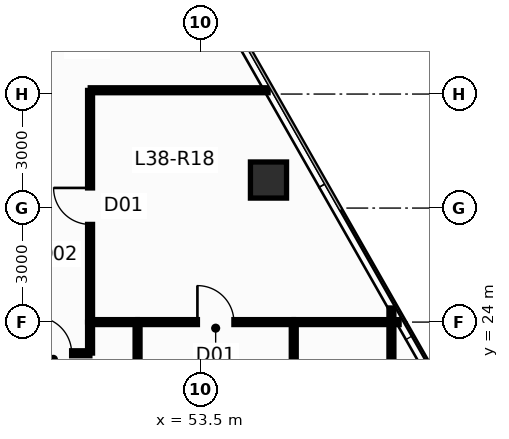
"""IFC4 building model, lengths in metres.
Left out: names, types, materials, properties, quantities, classifications, styles, units other than length and angle.
Written with IfcOpenShell. Run it as: python <this file> out.ifc"""

import sys

from ifc_helpers import new_model, si_unit, direction, frame, frame_2d, origin, origin_2d, place, context, subcontext, project, spatial, rectangle, hollow_rectangle, extrude, source, transform, mapped, element, fill, save


model = new_model("IFC4")
c1 = context("Model", 3, precision=1e-05, world=origin(), true_north=direction((0.0, 1.0)))
c2 = subcontext(c1, "Body", "Model", "MODEL_VIEW")
j1 = project(units=[si_unit("LENGTHUNIT", "METRE"), si_unit("PLANEANGLEUNIT", "RADIAN")], contexts=[c1])
p1 = place(None, origin())
s1 = spatial("IfcSite", under=j1, at=p1, CompositionType="ELEMENT")
p2 = place(p1, origin())
s2 = spatial("IfcBuilding", under=s1, at=p2, CompositionType="ELEMENT")
p3 = place(p2, frame((0.0, 0.0, 146.4)))
s3 = spatial("IfcBuildingStorey", under=s2, at=p3, CompositionType="ELEMENT", Elevation=146.4)
m1 = source(origin(), c2, "Body", "SweptSolid", [
    extrude(hollow_rectangle(XDim=0.95, YDim=0.95, WallThickness=0.05, at=origin_2d()), origin(), (0.0, 0.0, 1.0), 3.651),
])
p4 = place(p3, frame((55.295, 27.738, 0.0), z_axis=(-0.014912316331, -0.013775502979, 0.999793907933), x_axis=(0.678553674548, -0.734550822447, 0.0)))
e1 = element("IfcColumn", 1, at=p4, inside=s3, PredefinedType="COLUMN", context=c2, shape_type="MappedRepresentation", body=[
    mapped(m1, transform((0.0, 0.0, 0.0), scale=1.0)),
])
p5 = place(p3, frame((55.96, 6.254, 0.0), z_axis=(0.0, 0.0, 1.0), x_axis=(0.0, 1.0, 0.0)))
e2 = element("IfcWall", 2, at=p5, inside=s3, PredefinedType="PARTITIONING", context=c2, shape_type="SweptSolid", body=[
    extrude(rectangle(XDim=17.741, YDim=0.13, at=frame_2d((8.87, 0.0))), origin(), (0.0, 0.0, 1.0), 2.928),
])
p6 = place(p5, frame((8.438, 0.0, 0.0)))
e3 = element("IfcOpeningElement", 3, at=p6, cuts=e2, PredefinedType="OPENING", context=c2, shape_type="SweptSolid", body=[
    extrude(rectangle(XDim=0.96, YDim=2.15, at=frame_2d((0.48, 1.075))), frame((0.0, 0.077, 0.0), z_axis=(0.0, -1.0, 0.0), x_axis=(1.0, 0.0, 0.0)), (0.0, 0.0, 1.0), 0.154),
])
p7 = place(p3, frame((51.85, 6.288, 0.0), z_axis=(0.0, 0.0, 1.0), x_axis=(0.0, 1.0, 0.0)))
e4 = element("IfcWall", 4, at=p7, inside=s3, PredefinedType="PARTITIONING", context=c2, shape_type="SweptSolid", body=[
    extrude(rectangle(XDim=17.707, YDim=0.13, at=frame_2d((8.854, 0.0))), origin(), (0.0, 0.0, 1.0), 2.928),
])
p8 = place(p3, frame((58.53, 6.587, 0.0), z_axis=(0.0, 0.0, 1.0), x_axis=(0.0, 1.0, 0.0)))
e5 = element("IfcWall", 5, at=p8, inside=s3, PredefinedType="PARTITIONING", context=c2, shape_type="SweptSolid", body=[
    extrude(rectangle(XDim=17.785, YDim=0.13, at=frame_2d((8.892, 0.0))), origin(), (0.0, 0.0, 1.0), 3.25),
])
p9 = place(p8, frame((8.322, 0.0, 0.0)))
e6 = element("IfcOpeningElement", 6, at=p9, cuts=e5, PredefinedType="OPENING", context=c2, shape_type="SweptSolid", body=[
    extrude(rectangle(XDim=0.96, YDim=2.15, at=frame_2d((0.48, 1.075))), frame((0.0, 0.077, 0.0), z_axis=(0.0, -1.0, 0.0), x_axis=(1.0, 0.0, 0.0)), (0.0, 0.0, 1.0), 0.154),
])
p10 = place(p3, frame((50.6, 24.005, 0.0), z_axis=(0.0, 0.0, 1.0), x_axis=(0.0, 1.0, 0.0)))
e7 = element("IfcWall", 7, at=p10, inside=s3, PredefinedType="PARTITIONING", context=c2, shape_type="SweptSolid", body=[
    extrude(rectangle(XDim=6.09, YDim=0.13, at=frame_2d((3.045, 0.0))), origin(), (0.0, 0.0, 1.0), 2.928),
])
p11 = place(p10, frame((2.565, 0.0, 0.0)))
e8 = element("IfcOpeningElement", 8, at=p11, cuts=e7, PredefinedType="OPENING", context=c2, shape_type="SweptSolid", body=[
    extrude(rectangle(XDim=0.96, YDim=2.15, at=frame_2d((0.48, 1.075))), frame((0.0, 0.077, 0.0), z_axis=(0.0, -1.0, 0.0), x_axis=(1.0, 0.0, 0.0)), (0.0, 0.0, 1.0), 0.154),
])
p12 = place(p3, frame((50.605, 30.1, 0.0), z_axis=(0.0, 0.0, 1.0), x_axis=(1.0, 0.0, 0.0)))
e9 = element("IfcWall", 9, at=p12, inside=s3, PredefinedType="PARTITIONING", context=c2, shape_type="SweptSolid", body=[
    extrude(rectangle(XDim=4.68, YDim=0.13, at=frame_2d((2.34, 0.0))), origin(), (0.0, 0.0, 1.0), 3.25),
])
p13 = place(p3, frame((51.855, 24.0, 0.0), z_axis=(0.0, 0.0, 1.0), x_axis=(1.0, 0.0, 0.0)))
e10 = element("IfcWall", 10, at=p13, inside=s3, PredefinedType="PARTITIONING", context=c2, shape_type="SweptSolid", body=[
    extrude(rectangle(XDim=4.1, YDim=0.13, at=frame_2d((2.05, 0.0))), origin(), (0.0, 0.0, 1.0), 3.25),
])
p14 = place(p13, frame((1.57, 0.0, 0.0)))
e11 = element("IfcOpeningElement", 11, at=p14, cuts=e10, PredefinedType="OPENING", context=c2, shape_type="SweptSolid", body=[
    extrude(rectangle(XDim=0.96, YDim=2.15, at=frame_2d((0.48, 1.075))), frame((0.0, 0.077, 0.0), z_axis=(0.0, -1.0, 0.0), x_axis=(1.0, 0.0, 0.0)), (0.0, 0.0, 1.0), 0.154),
])
p15 = place(p3, frame((55.965, 24.0, 0.0), z_axis=(0.0, 0.0, 1.0), x_axis=(1.0, 0.0, 0.0)))
e12 = element("IfcWall", 12, at=p15, inside=s3, PredefinedType="PARTITIONING", context=c2, shape_type="SweptSolid", body=[
    extrude(rectangle(XDim=2.768, YDim=0.13, at=frame_2d((1.384, 0.0))), origin(), (0.0, 0.0, 1.0), 3.25),
])
p16 = place(p3, frame((48.675, 23.18, 0.0), z_axis=(0.0, 0.0, 1.0), x_axis=(1.0, 0.0, 0.0)))
e13 = element("IfcWall", 13, at=p16, inside=s3, PredefinedType="PARTITIONING", context=c2, shape_type="SweptSolid", body=[
    extrude(rectangle(XDim=1.92, YDim=0.13, at=frame_2d((0.96, 0.0))), origin(), (0.0, 0.0, 1.0), 3.25),
])
p17 = place(p16, frame((0.48, 0.0, 0.0)))
e14 = element("IfcOpeningElement", 14, at=p17, cuts=e13, PredefinedType="OPENING", context=c2, shape_type="SweptSolid", body=[
    extrude(rectangle(XDim=0.96, YDim=2.15, at=frame_2d((0.48, 1.075))), frame((0.0, 0.077, 0.0), z_axis=(0.0, -1.0, 0.0), x_axis=(1.0, 0.0, 0.0)), (0.0, 0.0, 1.0), 0.154),
])
p18 = place(p3, frame((50.605, 24.0, 0.0), z_axis=(0.0, 0.0, 1.0), x_axis=(1.0, 0.0, 0.0)))
e15 = element("IfcWall", 15, at=p18, inside=s3, PredefinedType="PARTITIONING", context=c2, shape_type="SweptSolid", body=[
    extrude(rectangle(XDim=1.24, YDim=0.13, at=frame_2d((0.62, 0.0))), origin(), (0.0, 0.0, 1.0), 3.25),
])
p19 = place(p3, frame((50.6, 23.185, 0.0), z_axis=(0.0, 0.0, 1.0), x_axis=(0.0, 1.0, 0.0)))
e16 = element("IfcWall", 16, at=p19, inside=s3, PredefinedType="PARTITIONING", context=c2, shape_type="SweptSolid", body=[
    extrude(rectangle(XDim=0.81, YDim=0.13, at=frame_2d((0.405, 0.0))), origin(), (0.0, 0.0, 1.0), 3.25),
])
p20 = place(p11, origin())
e17 = element("IfcDoor", 17, at=p20, inside=s3, OperationType="SINGLE_SWING_RIGHT", PredefinedType="DOOR", context=c2, shape_type="SweptSolid", body=[
    extrude(rectangle(XDim=0.96, YDim=2.15, at=frame_2d((0.48, 1.075))), frame((0.0, 0.025, 0.0), z_axis=(0.0, -1.0, 0.0), x_axis=(1.0, 0.0, 0.0)), (0.0, 0.0, 1.0), 0.05),
])
fill(e8, e17)
p21 = place(p14, origin())
e18 = element("IfcDoor", 18, at=p21, inside=s3, OperationType="SINGLE_SWING_LEFT", PredefinedType="DOOR", context=c2, shape_type="SweptSolid", body=[
    extrude(rectangle(XDim=0.96, YDim=2.15, at=frame_2d((0.48, 1.075))), frame((0.0, 0.025, 0.0), z_axis=(0.0, -1.0, 0.0), x_axis=(1.0, 0.0, 0.0)), (0.0, 0.0, 1.0), 0.05),
])
fill(e11, e18)
p22 = place(p17, origin())
e19 = element("IfcDoor", 19, at=p22, inside=s3, OperationType="SINGLE_SWING_LEFT", PredefinedType="DOOR", context=c2, shape_type="SweptSolid", body=[
    extrude(rectangle(XDim=0.96, YDim=2.15, at=frame_2d((0.48, 1.075))), frame((0.0, 0.025, 0.0), z_axis=(0.0, -1.0, 0.0), x_axis=(1.0, 0.0, 0.0)), (0.0, 0.0, 1.0), 0.05),
])
fill(e14, e19)
save(model, sys.argv[1])
